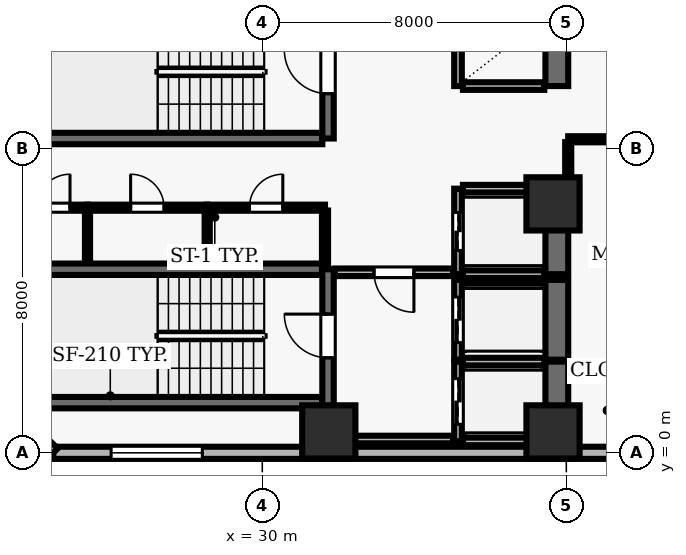
"""IFC4 building model, lengths in metres.
Left out: names, types, materials, properties, quantities, classifications, styles, units other than length and angle.
Written with IfcOpenShell. Run it as: python <this file> out.ifc"""

import sys

from ifc_helpers import new_model, si_unit, direction, frame, frame_2d, origin, origin_2d, place, context, subcontext, project, spatial, rectangle, extrude, element, fill, save


model = new_model("IFC4")
c1 = context("Model", 3, precision=1e-05, world=origin(), true_north=direction((0.0, 1.0)))
c2 = subcontext(c1, "Body", "Model", "MODEL_VIEW")
j1 = project(units=[si_unit("LENGTHUNIT", "METRE"), si_unit("PLANEANGLEUNIT", "RADIAN")], contexts=[c1])
p1 = place(None, origin())
s1 = spatial("IfcSite", under=j1, at=p1, CompositionType="ELEMENT")
p2 = place(p1, origin())
s2 = spatial("IfcBuilding", under=s1, at=p2, CompositionType="ELEMENT")
p3 = place(p2, frame((0.0, 0.0, 34.9)))
s3 = spatial("IfcBuildingStorey", under=s2, at=p3, CompositionType="ELEMENT", Elevation=34.9)
for number, where, z_axis, x_axis in (
    (1, (31.75, 0.55, 0.0), (0.0, 0.0, 1.0), (1.0, 0.0, 0.0)),
    (2, (37.65, 0.55, 0.0), (0.0, 0.0, 1.0), (1.0, 0.0, 0.0)),
    (3, (37.65, 6.55, 0.0), (0.0, 0.0, 1.0), (1.0, 0.0, 0.0)),
):
    element("IfcColumn", number, at=place(p3, frame(where, z_axis=z_axis, x_axis=x_axis)), inside=s3, PredefinedType="COLUMN", context=c2, shape_type="SweptSolid", body=[
        extrude(rectangle(XDim=1.4, YDim=1.4, at=origin_2d()), origin(), (0.0, 0.0, 1.0), 3.9),
    ])
p4 = place(p3, frame((24.5, 0.0, 0.0), z_axis=(0.0, 0.0, 1.0), x_axis=(1.0, 0.0, 0.0)))
e4 = element("IfcWall", 4, at=p4, inside=s3, PredefinedType="SOLIDWALL", context=c2, shape_type="SweptSolid", body=[
    extrude(rectangle(XDim=49.0, YDim=0.32, at=frame_2d((24.5, 0.0))), origin(), (0.0, 0.0, 1.0), 3.69),
])
p5 = place(p4, frame((1.522, 0.0, 0.9)))
e5 = element("IfcOpeningElement", 5, at=p5, cuts=e4, PredefinedType="OPENING", context=c2, shape_type="SweptSolid", body=[
    extrude(rectangle(XDim=2.4, YDim=1.8, at=frame_2d((1.2, 0.9))), frame((0.0, 0.17, 0.0), z_axis=(0.0, -1.0, 0.0), x_axis=(1.0, 0.0, 0.0)), (0.0, 0.0, 1.0), 0.34),
])
p6 = place(p4, frame((17.856, 0.0, 0.9)))
e6 = element("IfcOpeningElement", 6, at=p6, cuts=e4, PredefinedType="OPENING", context=c2, shape_type="SweptSolid", body=[
    extrude(rectangle(XDim=2.4, YDim=1.8, at=frame_2d((1.2, 0.9))), frame((0.0, 0.17, 0.0), z_axis=(0.0, -1.0, 0.0), x_axis=(1.0, 0.0, 0.0)), (0.0, 0.0, 1.0), 0.34),
])
p7 = place(p4, frame((23.3, 0.0, 0.9)))
e7 = element("IfcOpeningElement", 7, at=p7, cuts=e4, PredefinedType="OPENING", context=c2, shape_type="SweptSolid", body=[
    extrude(rectangle(XDim=2.4, YDim=1.8, at=frame_2d((1.2, 0.9))), frame((0.0, 0.17, 0.0), z_axis=(0.0, -1.0, 0.0), x_axis=(1.0, 0.0, 0.0)), (0.0, 0.0, 1.0), 0.34),
])
p8 = place(p4, frame((28.744, 0.0, 0.9)))
e8 = element("IfcOpeningElement", 8, at=p8, cuts=e4, PredefinedType="OPENING", context=c2, shape_type="SweptSolid", body=[
    extrude(rectangle(XDim=2.4, YDim=1.8, at=frame_2d((1.2, 0.9))), frame((0.0, 0.17, 0.0), z_axis=(0.0, -1.0, 0.0), x_axis=(1.0, 0.0, 0.0)), (0.0, 0.0, 1.0), 0.34),
])
p9 = place(p4, frame((34.189, 0.0, 0.9)))
e9 = element("IfcOpeningElement", 9, at=p9, cuts=e4, PredefinedType="OPENING", context=c2, shape_type="SweptSolid", body=[
    extrude(rectangle(XDim=2.4, YDim=1.8, at=frame_2d((1.2, 0.9))), frame((0.0, 0.17, 0.0), z_axis=(0.0, -1.0, 0.0), x_axis=(1.0, 0.0, 0.0)), (0.0, 0.0, 1.0), 0.34),
])
p10 = place(p4, frame((40.533, 0.0, 0.9)))
e10 = element("IfcOpeningElement", 10, at=p10, cuts=e4, PredefinedType="OPENING", context=c2, shape_type="SweptSolid", body=[
    extrude(rectangle(XDim=2.4, YDim=1.8, at=frame_2d((1.2, 0.9))), frame((0.0, 0.17, 0.0), z_axis=(0.0, -1.0, 0.0), x_axis=(1.0, 0.0, 0.0)), (0.0, 0.0, 1.0), 0.34),
])
p11 = place(p4, frame((45.078, 0.0, 0.9)))
e11 = element("IfcOpeningElement", 11, at=p11, cuts=e4, PredefinedType="OPENING", context=c2, shape_type="SweptSolid", body=[
    extrude(rectangle(XDim=2.4, YDim=1.8, at=frame_2d((1.2, 0.9))), frame((0.0, 0.17, 0.0), z_axis=(0.0, -1.0, 0.0), x_axis=(1.0, 0.0, 0.0)), (0.0, 0.0, 1.0), 0.34),
])
p12 = place(p3, frame((22.0, 2.5, 0.0), z_axis=(0.0, 0.0, 1.0), x_axis=(0.707106781187, -0.707106781187, 0.0)))
e12 = element("IfcWall", 12, at=p12, inside=s3, PredefinedType="SOLIDWALL", context=c2, shape_type="SweptSolid", body=[
    extrude(rectangle(XDim=3.536, YDim=0.32, at=frame_2d((1.768, 0.0))), origin(), (0.0, 0.0, 1.0), 3.69),
])
for number, where, z_axis, x_axis in (
    (13, (31.58, 4.83, 0.0), (0.0, 0.0, 1.0), (-1.0, 0.0, 0.0)),
    (14, (23.22, 1.32, 0.0), (0.0, 0.0, 1.0), (1.0, 0.0, 0.0)),
):
    element("IfcWall", number, at=place(p3, frame(where, z_axis=z_axis, x_axis=x_axis)), inside=s3, PredefinedType="SHEAR", context=c2, shape_type="SweptSolid", body=[
        extrude(rectangle(XDim=8.36, YDim=0.3, at=frame_2d((4.18, 0.0))), origin(), (0.0, 0.0, 1.0), 3.69),
    ])
p13 = place(p3, frame((31.73, 0.96, 0.0), z_axis=(0.0, 0.0, 1.0), x_axis=(0.0, 1.0, 0.0)))
e15 = element("IfcWall", 15, at=p13, inside=s3, PredefinedType="SHEAR", context=c2, shape_type="SweptSolid", body=[
    extrude(rectangle(XDim=3.87, YDim=0.3, at=frame_2d((1.935, 0.0))), origin(), (0.0, 0.0, 1.0), 3.69),
])
p14 = place(p13, frame((1.54, 0.0, 0.0)))
e16 = element("IfcOpeningElement", 16, at=p14, cuts=e15, PredefinedType="OPENING", context=c2, shape_type="SweptSolid", body=[
    extrude(rectangle(XDim=1.15, YDim=2.15, at=frame_2d((0.575, 1.075))), frame((0.0, 0.16, 0.0), z_axis=(0.0, -1.0, 0.0), x_axis=(1.0, 0.0, 0.0)), (0.0, 0.0, 1.0), 0.32),
])
p15 = place(p3, frame((23.22, 8.27, 0.0), z_axis=(0.0, 0.0, 1.0), x_axis=(1.0, 0.0, 0.0)))
e17 = element("IfcWall", 17, at=p15, inside=s3, PredefinedType="SHEAR", context=c2, shape_type="SweptSolid", body=[
    extrude(rectangle(XDim=8.36, YDim=0.3, at=frame_2d((4.18, 0.0))), origin(), (0.0, 0.0, 1.0), 3.69),
])
p16 = place(p3, frame((31.73, 8.27, 0.0), z_axis=(0.0, 0.0, 1.0), x_axis=(0.0, 1.0, 0.0)))
e18 = element("IfcWall", 18, at=p16, inside=s3, PredefinedType="SHEAR", context=c2, shape_type="SweptSolid", body=[
    extrude(rectangle(XDim=3.51, YDim=0.3, at=frame_2d((1.755, 0.0))), origin(), (0.0, 0.0, 1.0), 3.69),
])
p17 = place(p16, frame((1.18, 0.0, 0.0)))
e19 = element("IfcOpeningElement", 19, at=p17, cuts=e18, PredefinedType="OPENING", context=c2, shape_type="SweptSolid", body=[
    extrude(rectangle(XDim=1.15, YDim=2.15, at=frame_2d((0.575, 1.075))), frame((0.0, 0.16, 0.0), z_axis=(0.0, -1.0, 0.0), x_axis=(1.0, 0.0, 0.0)), (0.0, 0.0, 1.0), 0.32),
])
p18 = place(p3, frame((35.15, 2.4, 0.0), z_axis=(0.0, 0.0, 1.0), x_axis=(0.0, -1.0, 0.0)))
e20 = element("IfcWall", 20, at=p18, inside=s3, PredefinedType="SOLIDWALL", context=c2, shape_type="SweptSolid", body=[
    extrude(rectangle(XDim=2.1, YDim=0.2, at=frame_2d((1.05, 0.0))), origin(), (0.0, 0.0, 1.0), 3.69),
])
p19 = place(p18, frame((0.45, 0.0, 0.0)))
e21 = element("IfcOpeningElement", 21, at=p19, cuts=e20, PredefinedType="OPENING", context=c2, shape_type="SweptSolid", body=[
    extrude(rectangle(XDim=1.2, YDim=2.15, at=frame_2d((0.6, 1.075))), frame((0.0, 0.11, 0.0), z_axis=(0.0, -1.0, 0.0), x_axis=(1.0, 0.0, 0.0)), (0.0, 0.0, 1.0), 0.22),
])
p20 = place(p3, frame((37.75, 0.3, 0.0), z_axis=(0.0, 0.0, 1.0), x_axis=(0.0, 1.0, 0.0)))
e22 = element("IfcWall", 22, at=p20, inside=s3, PredefinedType="SHEAR", context=c2, shape_type="SweptSolid", body=[
    extrude(rectangle(XDim=2.1, YDim=0.6, at=frame_2d((1.05, 0.0))), origin(), (0.0, 0.0, 1.0), 3.69),
])
for number, where, z_axis, x_axis in (
    (23, (35.28, 0.3, 0.0), (0.0, 0.0, 1.0), (1.0, 0.0, 0.0)),
    (24, (37.42, 2.4, 0.0), (0.0, 0.0, 1.0), (-1.0, 0.0, 0.0)),
):
    element("IfcWall", number, at=place(p3, frame(where, z_axis=z_axis, x_axis=x_axis)), inside=s3, PredefinedType="SOLIDWALL", context=c2, shape_type="SweptSolid", body=[
        extrude(rectangle(XDim=2.14, YDim=0.2, at=frame_2d((1.07, 0.0))), origin(), (0.0, 0.0, 1.0), 3.69),
    ])
p21 = place(p3, frame((35.15, 4.55, 0.0), z_axis=(0.0, 0.0, 1.0), x_axis=(0.0, -1.0, 0.0)))
e25 = element("IfcWall", 25, at=p21, inside=s3, PredefinedType="SOLIDWALL", context=c2, shape_type="SweptSolid", body=[
    extrude(rectangle(XDim=2.1, YDim=0.2, at=frame_2d((1.05, 0.0))), origin(), (0.0, 0.0, 1.0), 3.69),
])
p22 = place(p21, frame((0.45, 0.0, 0.0)))
e26 = element("IfcOpeningElement", 26, at=p22, cuts=e25, PredefinedType="OPENING", context=c2, shape_type="SweptSolid", body=[
    extrude(rectangle(XDim=1.2, YDim=2.15, at=frame_2d((0.6, 1.075))), frame((0.0, 0.11, 0.0), z_axis=(0.0, -1.0, 0.0), x_axis=(1.0, 0.0, 0.0)), (0.0, 0.0, 1.0), 0.22),
])
p23 = place(p3, frame((37.75, 2.45, 0.0), z_axis=(0.0, 0.0, 1.0), x_axis=(0.0, 1.0, 0.0)))
e27 = element("IfcWall", 27, at=p23, inside=s3, PredefinedType="SHEAR", context=c2, shape_type="SweptSolid", body=[
    extrude(rectangle(XDim=2.1, YDim=0.6, at=frame_2d((1.05, 0.0))), origin(), (0.0, 0.0, 1.0), 3.69),
])
p24 = place(p3, frame((37.42, 4.55, 0.0), z_axis=(0.0, 0.0, 1.0), x_axis=(-1.0, 0.0, 0.0)))
e28 = element("IfcWall", 28, at=p24, inside=s3, PredefinedType="SOLIDWALL", context=c2, shape_type="SweptSolid", body=[
    extrude(rectangle(XDim=2.14, YDim=0.2, at=frame_2d((1.07, 0.0))), origin(), (0.0, 0.0, 1.0), 3.69),
])
p25 = place(p3, frame((35.15, 6.95, 0.0), z_axis=(0.0, 0.0, 1.0), x_axis=(0.0, -1.0, 0.0)))
e29 = element("IfcWall", 29, at=p25, inside=s3, PredefinedType="SOLIDWALL", context=c2, shape_type="SweptSolid", body=[
    extrude(rectangle(XDim=2.25, YDim=0.2, at=frame_2d((1.125, 0.0))), origin(), (0.0, 0.0, 1.0), 3.69),
])
p26 = place(p25, frame((0.625, 0.0, 0.0)))
e30 = element("IfcOpeningElement", 30, at=p26, cuts=e29, PredefinedType="OPENING", context=c2, shape_type="SweptSolid", body=[
    extrude(rectangle(XDim=1.0, YDim=2.1, at=frame_2d((0.5, 1.05))), frame((0.0, 0.11, 0.0), z_axis=(0.0, -1.0, 0.0), x_axis=(1.0, 0.0, 0.0)), (0.0, 0.0, 1.0), 0.22),
])
p27 = place(p3, frame((37.75, 4.7, 0.0), z_axis=(0.0, 0.0, 1.0), x_axis=(0.0, 1.0, 0.0)))
e31 = element("IfcWall", 31, at=p27, inside=s3, PredefinedType="SHEAR", context=c2, shape_type="SweptSolid", body=[
    extrude(rectangle(XDim=2.25, YDim=0.6, at=frame_2d((1.125, 0.0))), origin(), (0.0, 0.0, 1.0), 3.69),
])
for number, where, z_axis, x_axis in (
    (32, (35.28, 4.7, 0.0), (0.0, 0.0, 1.0), (1.0, 0.0, 0.0)),
    (33, (37.42, 6.95, 0.0), (0.0, 0.0, 1.0), (-1.0, 0.0, 0.0)),
):
    element("IfcWall", number, at=place(p3, frame(where, z_axis=z_axis, x_axis=x_axis)), inside=s3, PredefinedType="SOLIDWALL", context=c2, shape_type="SweptSolid", body=[
        extrude(rectangle(XDim=2.14, YDim=0.2, at=frame_2d((1.07, 0.0))), origin(), (0.0, 0.0, 1.0), 3.69),
    ])
p28 = place(p3, frame((35.15, 11.55, 0.0), z_axis=(0.0, 0.0, 1.0), x_axis=(0.0, -1.0, 0.0)))
e34 = element("IfcWall", 34, at=p28, inside=s3, PredefinedType="SOLIDWALL", context=c2, shape_type="SweptSolid", body=[
    extrude(rectangle(XDim=1.9, YDim=0.2, at=frame_2d((0.95, 0.0))), origin(), (0.0, 0.0, 1.0), 3.69),
])
p29 = place(p3, frame((37.75, 9.65, 0.0), z_axis=(0.0, 0.0, 1.0), x_axis=(0.0, 1.0, 0.0)))
e35 = element("IfcWall", 35, at=p29, inside=s3, PredefinedType="SHEAR", context=c2, shape_type="SweptSolid", body=[
    extrude(rectangle(XDim=1.9, YDim=0.6, at=frame_2d((0.95, 0.0))), origin(), (0.0, 0.0, 1.0), 3.69),
])
p30 = place(p3, frame((35.28, 9.65, 0.0), z_axis=(0.0, 0.0, 1.0), x_axis=(1.0, 0.0, 0.0)))
e36 = element("IfcWall", 36, at=p30, inside=s3, PredefinedType="SOLIDWALL", context=c2, shape_type="SweptSolid", body=[
    extrude(rectangle(XDim=2.14, YDim=0.2, at=frame_2d((1.07, 0.0))), origin(), (0.0, 0.0, 1.0), 3.69),
])
p31 = place(p3, frame((22.2, 6.45, 0.0), z_axis=(0.0, 0.0, 1.0), x_axis=(1.0, 0.0, 0.0)))
e37 = element("IfcWall", 37, at=p31, inside=s3, PredefinedType="PARTITIONING", context=c2, shape_type="SweptSolid", body=[
    extrude(rectangle(XDim=3.2, YDim=0.16, at=frame_2d((1.6, 0.0))), origin(), (0.0, 0.0, 1.0), 3.69),
])
p32 = place(p31, frame((1.86, 0.0, 0.0)))
e38 = element("IfcOpeningElement", 38, at=p32, cuts=e37, PredefinedType="OPENING", context=c2, shape_type="SweptSolid", body=[
    extrude(rectangle(XDim=0.88, YDim=2.1, at=frame_2d((0.44, 1.05))), frame((0.0, 0.09, 0.0), z_axis=(0.0, -1.0, 0.0), x_axis=(1.0, 0.0, 0.0)), (0.0, 0.0, 1.0), 0.18),
])
p33 = place(p3, frame((25.4, 6.45, 0.0), z_axis=(0.0, 0.0, 1.0), x_axis=(1.0, 0.0, 0.0)))
e39 = element("IfcWall", 39, at=p33, inside=s3, PredefinedType="PARTITIONING", context=c2, shape_type="SweptSolid", body=[
    extrude(rectangle(XDim=3.15, YDim=0.16, at=frame_2d((1.575, 0.0))), origin(), (0.0, 0.0, 1.0), 3.69),
])
p34 = place(p33, frame((1.135, 0.0, 0.0)))
e40 = element("IfcOpeningElement", 40, at=p34, cuts=e39, PredefinedType="OPENING", context=c2, shape_type="SweptSolid", body=[
    extrude(rectangle(XDim=0.88, YDim=2.1, at=frame_2d((0.44, 1.05))), frame((0.0, 0.09, 0.0), z_axis=(0.0, -1.0, 0.0), x_axis=(1.0, 0.0, 0.0)), (0.0, 0.0, 1.0), 0.18),
])
p35 = place(p3, frame((28.55, 6.45, 0.0), z_axis=(0.0, 0.0, 1.0), x_axis=(1.0, 0.0, 0.0)))
e41 = element("IfcWall", 41, at=p35, inside=s3, PredefinedType="PARTITIONING", context=c2, shape_type="SweptSolid", body=[
    extrude(rectangle(XDim=3.1, YDim=0.16, at=frame_2d((1.55, 0.0))), origin(), (0.0, 0.0, 1.0), 3.69),
])
p36 = place(p35, frame((1.11, 0.0, 0.0)))
e42 = element("IfcOpeningElement", 42, at=p36, cuts=e41, PredefinedType="OPENING", context=c2, shape_type="SweptSolid", body=[
    extrude(rectangle(XDim=0.88, YDim=2.1, at=frame_2d((0.44, 1.05))), frame((0.0, 0.09, 0.0), z_axis=(0.0, -1.0, 0.0), x_axis=(1.0, 0.0, 0.0)), (0.0, 0.0, 1.0), 0.18),
])
p37 = place(p3, frame((31.65, 0.35, 0.0), z_axis=(0.0, 0.0, 1.0), x_axis=(1.0, 0.0, 0.0)))
e43 = element("IfcWall", 43, at=p37, inside=s3, PredefinedType="SOLIDWALL", context=c2, shape_type="SweptSolid", body=[
    extrude(rectangle(XDim=3.37, YDim=0.2, at=frame_2d((1.685, 0.0))), origin(), (0.0, 0.0, 1.0), 3.69),
])
p38 = place(p3, frame((35.02, 4.75, 0.0), z_axis=(0.0, 0.0, 1.0), x_axis=(-1.0, 0.0, 0.0)))
e44 = element("IfcWall", 44, at=p38, inside=s3, PredefinedType="SOLIDWALL", context=c2, shape_type="SweptSolid", body=[
    extrude(rectangle(XDim=3.11, YDim=0.2, at=frame_2d((1.555, 0.0))), origin(), (0.0, 0.0, 1.0), 3.69),
])
p39 = place(p38, frame((1.03, 0.0, 0.0)))
e45 = element("IfcOpeningElement", 45, at=p39, cuts=e44, PredefinedType="OPENING", context=c2, shape_type="SweptSolid", body=[
    extrude(rectangle(XDim=1.05, YDim=2.15, at=frame_2d((0.525, 1.075))), frame((0.0, 0.11, 0.0), z_axis=(0.0, -1.0, 0.0), x_axis=(1.0, 0.0, 0.0)), (0.0, 0.0, 1.0), 0.22),
])
p40 = place(p3, frame((38.05, 8.25, 0.0), z_axis=(0.0, 0.0, 1.0), x_axis=(1.0, 0.0, 0.0)))
e46 = element("IfcWall", 46, at=p40, inside=s3, PredefinedType="PARTITIONING", context=c2, shape_type="SweptSolid", body=[
    extrude(rectangle(XDim=2.3, YDim=0.16, at=frame_2d((1.15, 0.0))), origin(), (0.0, 0.0, 1.0), 3.055),
])
p41 = place(p40, frame((1.0, 0.0, 0.0)))
e47 = element("IfcOpeningElement", 47, at=p41, cuts=e46, PredefinedType="OPENING", context=c2, shape_type="SweptSolid", body=[
    extrude(rectangle(XDim=1.0, YDim=2.1, at=frame_2d((0.5, 1.05))), frame((0.0, 0.09, 0.0), z_axis=(0.0, -1.0, 0.0), x_axis=(1.0, 0.0, 0.0)), (0.0, 0.0, 1.0), 0.18),
])
for number, where, z_axis, x_axis in (
    (48, (25.4, 5.01, 0.0), (0.0, 0.0, 1.0), (0.0, 1.0, 0.0)),
    (49, (28.55, 5.01, 0.0), (0.0, 0.0, 1.0), (0.0, 1.0, 0.0)),
):
    element("IfcWall", number, at=place(p3, frame(where, z_axis=z_axis, x_axis=x_axis)), inside=s3, PredefinedType="PARTITIONING", context=c2, shape_type="SweptSolid", body=[
        extrude(rectangle(XDim=1.365, YDim=0.135, at=frame_2d((0.683, 0.0))), origin(), (0.0, 0.0, 1.0), 3.69),
    ])
p42 = place(p3, frame((31.65, 4.86, 0.0), z_axis=(0.0, 0.0, 1.0), x_axis=(0.0, 1.0, 0.0)))
e50 = element("IfcWall", 50, at=p42, inside=s3, PredefinedType="PARTITIONING", context=c2, shape_type="SweptSolid", body=[
    extrude(rectangle(XDim=1.515, YDim=0.16, at=frame_2d((0.757, 0.0))), origin(), (0.0, 0.0, 1.0), 3.69),
])
p43 = place(p3, frame((38.05, 7.05, 0.0), z_axis=(0.0, 0.0, 1.0), x_axis=(0.0, 1.0, 0.0)))
e51 = element("IfcWall", 51, at=p43, inside=s3, PredefinedType="PARTITIONING", context=c2, shape_type="SweptSolid", body=[
    extrude(rectangle(XDim=1.125, YDim=0.16, at=frame_2d((0.562, 0.0))), origin(), (0.0, 0.0, 1.0), 3.055),
])
p44 = place(p5, origin())
e52 = element("IfcWindow", 52, at=p44, inside=s3, PartitioningType="SINGLE_PANEL", PredefinedType="WINDOW", context=c2, shape_type="SweptSolid", body=[
    extrude(rectangle(XDim=2.4, YDim=1.8, at=frame_2d((1.2, 0.9))), frame((0.0, 0.03, 0.0), z_axis=(0.0, -1.0, 0.0), x_axis=(1.0, 0.0, 0.0)), (0.0, 0.0, 1.0), 0.06),
])
fill(e5, e52)
p45 = place(p14, origin())
e53 = element("IfcDoor", 53, at=p45, inside=s3, OperationType="SINGLE_SWING_RIGHT", PredefinedType="DOOR", context=c2, shape_type="SweptSolid", body=[
    extrude(rectangle(XDim=1.15, YDim=2.15, at=frame_2d((0.575, 1.075))), frame((0.0, 0.025, 0.0), z_axis=(0.0, -1.0, 0.0), x_axis=(1.0, 0.0, 0.0)), (0.0, 0.0, 1.0), 0.05),
])
fill(e16, e53)
p46 = place(p17, origin())
e54 = element("IfcDoor", 54, at=p46, inside=s3, OperationType="SINGLE_SWING_RIGHT", PredefinedType="DOOR", context=c2, shape_type="SweptSolid", body=[
    extrude(rectangle(XDim=1.15, YDim=2.15, at=frame_2d((0.575, 1.075))), frame((0.0, 0.025, 0.0), z_axis=(0.0, -1.0, 0.0), x_axis=(1.0, 0.0, 0.0)), (0.0, 0.0, 1.0), 0.05),
])
fill(e19, e54)
p47 = place(p19, origin())
e55 = element("IfcDoor", 55, at=p47, inside=s3, OperationType="DOUBLE_DOOR_SLIDING", PredefinedType="DOOR", context=c2, shape_type="SweptSolid", body=[
    extrude(rectangle(XDim=1.2, YDim=2.15, at=frame_2d((0.6, 1.075))), frame((0.0, 0.025, 0.0), z_axis=(0.0, -1.0, 0.0), x_axis=(1.0, 0.0, 0.0)), (0.0, 0.0, 1.0), 0.05),
])
fill(e21, e55)
p48 = place(p22, origin())
e56 = element("IfcDoor", 56, at=p48, inside=s3, OperationType="DOUBLE_DOOR_SLIDING", PredefinedType="DOOR", context=c2, shape_type="SweptSolid", body=[
    extrude(rectangle(XDim=1.2, YDim=2.15, at=frame_2d((0.6, 1.075))), frame((0.0, 0.025, 0.0), z_axis=(0.0, -1.0, 0.0), x_axis=(1.0, 0.0, 0.0)), (0.0, 0.0, 1.0), 0.05),
])
fill(e26, e56)
p49 = place(p26, origin())
e57 = element("IfcDoor", 57, at=p49, inside=s3, OperationType="DOUBLE_DOOR_SLIDING", PredefinedType="DOOR", context=c2, shape_type="SweptSolid", body=[
    extrude(rectangle(XDim=1.0, YDim=2.1, at=frame_2d((0.5, 1.05))), frame((0.0, 0.025, 0.0), z_axis=(0.0, -1.0, 0.0), x_axis=(1.0, 0.0, 0.0)), (0.0, 0.0, 1.0), 0.05),
])
fill(e30, e57)
p50 = place(p39, origin())
e58 = element("IfcDoor", 58, at=p50, inside=s3, OperationType="SINGLE_SWING_LEFT", PredefinedType="DOOR", context=c2, shape_type="SweptSolid", body=[
    extrude(rectangle(XDim=1.05, YDim=2.15, at=frame_2d((0.525, 1.075))), frame((0.0, 0.025, 0.0), z_axis=(0.0, -1.0, 0.0), x_axis=(1.0, 0.0, 0.0)), (0.0, 0.0, 1.0), 0.05),
])
fill(e45, e58)
p51 = place(p32, origin())
e59 = element("IfcDoor", 59, at=p51, inside=s3, OperationType="SINGLE_SWING_RIGHT", PredefinedType="DOOR", context=c2, shape_type="SweptSolid", body=[
    extrude(rectangle(XDim=0.88, YDim=2.1, at=frame_2d((0.44, 1.05))), frame((0.0, 0.025, 0.0), z_axis=(0.0, -1.0, 0.0), x_axis=(1.0, 0.0, 0.0)), (0.0, 0.0, 1.0), 0.05),
])
fill(e38, e59)
p52 = place(p34, origin())
e60 = element("IfcDoor", 60, at=p52, inside=s3, OperationType="SINGLE_SWING_LEFT", PredefinedType="DOOR", context=c2, shape_type="SweptSolid", body=[
    extrude(rectangle(XDim=0.88, YDim=2.1, at=frame_2d((0.44, 1.05))), frame((0.0, 0.025, 0.0), z_axis=(0.0, -1.0, 0.0), x_axis=(1.0, 0.0, 0.0)), (0.0, 0.0, 1.0), 0.05),
])
fill(e40, e60)
p53 = place(p36, origin())
e61 = element("IfcDoor", 61, at=p53, inside=s3, OperationType="SINGLE_SWING_RIGHT", PredefinedType="DOOR", context=c2, shape_type="SweptSolid", body=[
    extrude(rectangle(XDim=0.88, YDim=2.1, at=frame_2d((0.44, 1.05))), frame((0.0, 0.025, 0.0), z_axis=(0.0, -1.0, 0.0), x_axis=(1.0, 0.0, 0.0)), (0.0, 0.0, 1.0), 0.05),
])
fill(e42, e61)
save(model, sys.argv[1])
